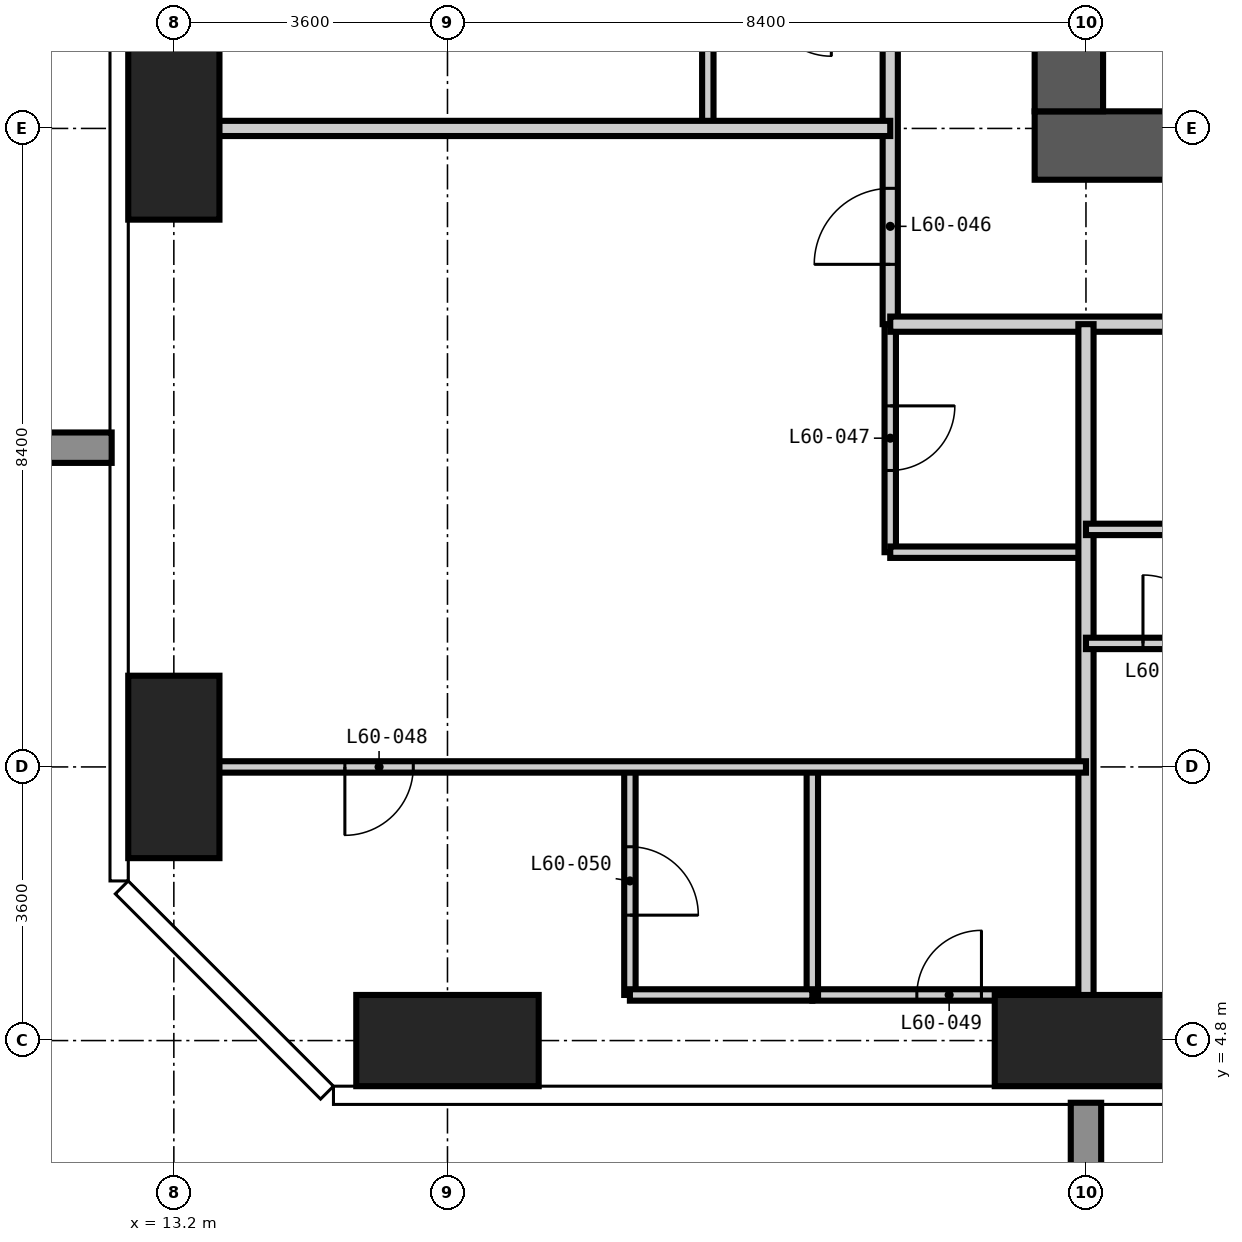
"""IFC4 building model, lengths in metres.
Left out: names, types, materials, properties, quantities, classifications, styles, units other than length and angle.
Written with IfcOpenShell. Run it as: python <this file> out.ifc"""

import sys

from ifc_helpers import new_model, si_unit, direction, frame, frame_2d, origin, origin_2d, place, context, subcontext, project, spatial, rectangle, extrude, element, fill, save


model = new_model("IFC4")
c1 = context("Model", 3, precision=1e-05, world=origin(), true_north=direction((0.0, 1.0)))
c2 = subcontext(c1, "Body", "Model", "MODEL_VIEW")
j1 = project(units=[si_unit("LENGTHUNIT", "METRE"), si_unit("PLANEANGLEUNIT", "RADIAN")], contexts=[c1])
p1 = place(None, origin())
s1 = spatial("IfcSite", under=j1, at=p1, CompositionType="ELEMENT")
p2 = place(p1, origin())
s2 = spatial("IfcBuilding", under=s1, at=p2, CompositionType="ELEMENT")
p3 = place(p2, frame((0.0, 0.0, 233.4)))
s3 = spatial("IfcBuildingStorey", under=s2, at=p3, CompositionType="ELEMENT", Elevation=233.4)
for number, where, z_axis, x_axis in (
    (1, (13.2, 8.4, -0.35), (0.0, 0.0, 1.0), (1.0, 0.0, 0.0)),
    (2, (13.2, 16.8, -0.35), (0.0, 0.0, 1.0), (1.0, 0.0, 0.0)),
):
    element("IfcColumn", number, at=place(p3, frame(where, z_axis=z_axis, x_axis=x_axis)), inside=s3, PredefinedType="COLUMN", context=c2, shape_type="SweptSolid", body=[
        extrude(rectangle(XDim=1.2, YDim=2.4, at=origin_2d()), origin(), (0.0, 0.0, 1.0), 3.9),
    ])
for number, where, z_axis, x_axis in (
    (3, (16.8, 4.8, -0.35), (0.0, 0.0, 1.0), (1.0, 0.0, 0.0)),
    (4, (25.2, 4.8, -0.35), (0.0, 0.0, 1.0), (1.0, 0.0, 0.0)),
):
    element("IfcColumn", number, at=place(p3, frame(where, z_axis=z_axis, x_axis=x_axis)), inside=s3, PredefinedType="COLUMN", context=c2, shape_type="SweptSolid", body=[
        extrude(rectangle(XDim=2.4, YDim=1.2, at=origin_2d()), origin(), (0.0, 0.0, 1.0), 3.9),
    ])
p4 = place(p3, frame((24.525, 16.575, -0.35), z_axis=(0.0, 0.0, 1.0), x_axis=(1.0, 0.0, 0.0)))
e5 = element("IfcWall", 5, at=p4, inside=s3, PredefinedType="SHEAR", context=c2, shape_type="SweptSolid", body=[
    extrude(rectangle(XDim=18.15, YDim=0.9, at=frame_2d((9.075, 0.0))), origin(), (0.0, 0.0, 1.0), 3.9),
])
p5 = place(p4, frame((4.375, 0.0, 0.35)))
e6 = element("IfcOpeningElement", 6, at=p5, cuts=e5, PredefinedType="OPENING", context=c2, shape_type="SweptSolid", body=[
    extrude(rectangle(XDim=1.0, YDim=2.1, at=frame_2d((0.5, 1.05))), frame((0.0, 0.46, 0.0), z_axis=(0.0, -1.0, 0.0), x_axis=(1.0, 0.0, 0.0)), (0.0, 0.0, 1.0), 0.92),
])
p6 = place(p4, frame((10.675, 0.0, 0.35)))
e7 = element("IfcOpeningElement", 7, at=p6, cuts=e5, PredefinedType="OPENING", context=c2, shape_type="SweptSolid", body=[
    extrude(rectangle(XDim=1.0, YDim=2.1, at=frame_2d((0.5, 1.05))), frame((0.0, 0.46, 0.0), z_axis=(0.0, -1.0, 0.0), x_axis=(1.0, 0.0, 0.0)), (0.0, 0.0, 1.0), 0.92),
])
p7 = place(p3, frame((24.975, 41.775, -0.35), z_axis=(0.0, 0.0, 1.0), x_axis=(0.0, -1.0, 0.0)))
e8 = element("IfcWall", 8, at=p7, inside=s3, PredefinedType="SHEAR", context=c2, shape_type="SweptSolid", body=[
    extrude(rectangle(XDim=24.75, YDim=0.9, at=frame_2d((12.375, 0.0))), origin(), (0.0, 0.0, 1.0), 3.9),
])
p8 = place(p7, frame((11.875, 0.0, 0.35)))
e9 = element("IfcOpeningElement", 9, at=p8, cuts=e8, PredefinedType="OPENING", context=c2, shape_type="SweptSolid", body=[
    extrude(rectangle(XDim=1.0, YDim=2.1, at=frame_2d((0.5, 1.05))), frame((0.0, 0.46, 0.0), z_axis=(0.0, -1.0, 0.0), x_axis=(1.0, 0.0, 0.0)), (0.0, 0.0, 1.0), 0.92),
])
p9 = place(p3, frame((20.225, 16.8, 0.0), z_axis=(0.0, 0.0, 1.0), x_axis=(0.0, 1.0, 0.0)))
e10 = element("IfcWall", 10, at=p9, inside=s3, PredefinedType="PARTITIONING", context=c2, shape_type="SweptSolid", body=[
    extrude(rectangle(XDim=1.8, YDim=0.15, at=frame_2d((0.9, 0.0))), origin(), (0.0, 0.0, 1.0), 3.55),
])
p10 = place(p3, frame((22.625, 11.225, 0.0), z_axis=(0.0, 0.0, 1.0), x_axis=(0.0, 1.0, 0.0)))
e11 = element("IfcWall", 11, at=p10, inside=s3, PredefinedType="PARTITIONING", context=c2, shape_type="SweptSolid", body=[
    extrude(rectangle(XDim=3.0, YDim=0.15, at=frame_2d((1.5, 0.0))), origin(), (0.0, 0.0, 1.0), 3.55),
])
p11 = place(p10, frame((1.075, 0.0, 0.0)))
e12 = element("IfcOpeningElement", 12, at=p11, cuts=e11, PredefinedType="OPENING", context=c2, shape_type="SweptSolid", body=[
    extrude(rectangle(XDim=0.85, YDim=2.1, at=frame_2d((0.425, 1.05))), frame((0.0, 0.085, 0.0), z_axis=(0.0, -1.0, 0.0), x_axis=(1.0, 0.0, 0.0)), (0.0, 0.0, 1.0), 0.17),
])
p12 = place(p3, frame((21.6, 5.4, 0.0), z_axis=(0.0, 0.0, 1.0), x_axis=(1.0, 0.0, 0.0)))
e13 = element("IfcWall", 13, at=p12, inside=s3, PredefinedType="PARTITIONING", context=c2, shape_type="SweptSolid", body=[
    extrude(rectangle(XDim=3.6, YDim=0.15, at=frame_2d((1.8, 0.0))), origin(), (0.0, 0.0, 1.0), 3.55),
])
p13 = place(p12, frame((1.375, 0.0, 0.0)))
e14 = element("IfcOpeningElement", 14, at=p13, cuts=e13, PredefinedType="OPENING", context=c2, shape_type="SweptSolid", body=[
    extrude(rectangle(XDim=0.85, YDim=2.1, at=frame_2d((0.425, 1.05))), frame((0.0, 0.085, 0.0), z_axis=(0.0, -1.0, 0.0), x_axis=(1.0, 0.0, 0.0)), (0.0, 0.0, 1.0), 0.17),
])
p14 = place(p3, frame((22.625, 11.225, 0.0), z_axis=(0.0, 0.0, 1.0), x_axis=(1.0, 0.0, 0.0)))
e15 = element("IfcWall", 15, at=p14, inside=s3, PredefinedType="PARTITIONING", context=c2, shape_type="SweptSolid", body=[
    extrude(rectangle(XDim=2.575, YDim=0.15, at=frame_2d((1.288, 0.0))), origin(), (0.0, 0.0, 1.0), 3.55),
])
p15 = place(p3, frame((22.625, 14.225, 0.0), z_axis=(0.0, 0.0, 1.0), x_axis=(0.0, 1.0, 0.0)))
e16 = element("IfcWall", 16, at=p15, inside=s3, PredefinedType="PARTITIONING", context=c2, shape_type="SweptSolid", body=[
    extrude(rectangle(XDim=30.95, YDim=0.2, at=frame_2d((15.475, 0.0))), origin(), (0.0, 0.0, 1.0), 3.55),
])
p16 = place(p15, frame((5.075, 0.0, 0.0)))
e17 = element("IfcOpeningElement", 17, at=p16, cuts=e16, PredefinedType="OPENING", context=c2, shape_type="SweptSolid", body=[
    extrude(rectangle(XDim=1.0, YDim=2.2, at=frame_2d((0.5, 1.1))), frame((0.0, 0.11, 0.0), z_axis=(0.0, -1.0, 0.0), x_axis=(1.0, 0.0, 0.0)), (0.0, 0.0, 1.0), 0.22),
])
p17 = place(p15, frame((13.475, 0.0, 0.0)))
e18 = element("IfcOpeningElement", 18, at=p17, cuts=e16, PredefinedType="OPENING", context=c2, shape_type="SweptSolid", body=[
    extrude(rectangle(XDim=1.0, YDim=2.2, at=frame_2d((0.5, 1.1))), frame((0.0, 0.11, 0.0), z_axis=(0.0, -1.0, 0.0), x_axis=(1.0, 0.0, 0.0)), (0.0, 0.0, 1.0), 0.22),
])
p18 = place(p15, frame((21.875, 0.0, 0.0)))
e19 = element("IfcOpeningElement", 19, at=p18, cuts=e16, PredefinedType="OPENING", context=c2, shape_type="SweptSolid", body=[
    extrude(rectangle(XDim=1.0, YDim=2.2, at=frame_2d((0.5, 1.1))), frame((0.0, 0.11, 0.0), z_axis=(0.0, -1.0, 0.0), x_axis=(1.0, 0.0, 0.0)), (0.0, 0.0, 1.0), 0.22),
])
p19 = place(p15, frame((0.787, 0.0, 0.0)))
e20 = element("IfcOpeningElement", 20, at=p19, cuts=e16, PredefinedType="OPENING", context=c2, shape_type="SweptSolid", body=[
    extrude(rectangle(XDim=1.0, YDim=2.2, at=frame_2d((0.5, 1.1))), frame((0.0, 0.11, 0.0), z_axis=(0.0, -1.0, 0.0), x_axis=(1.0, 0.0, 0.0)), (0.0, 0.0, 1.0), 0.22),
])
p20 = place(p15, frame((28.862, 0.0, 0.0)))
e21 = element("IfcOpeningElement", 21, at=p20, cuts=e16, PredefinedType="OPENING", context=c2, shape_type="SweptSolid", body=[
    extrude(rectangle(XDim=1.0, YDim=2.2, at=frame_2d((0.5, 1.1))), frame((0.0, 0.11, 0.0), z_axis=(0.0, -1.0, 0.0), x_axis=(1.0, 0.0, 0.0)), (0.0, 0.0, 1.0), 0.22),
])
p21 = place(p3, frame((44.875, 14.225, 0.0), z_axis=(0.0, 0.0, 1.0), x_axis=(-1.0, 0.0, 0.0)))
e22 = element("IfcWall", 22, at=p21, inside=s3, PredefinedType="PARTITIONING", context=c2, shape_type="SweptSolid", body=[
    extrude(rectangle(XDim=22.25, YDim=0.2, at=frame_2d((11.125, 0.0))), origin(), (0.0, 0.0, 1.0), 3.55),
])
p22 = place(p21, frame((15.875, 0.0, 0.0)))
e23 = element("IfcOpeningElement", 23, at=p22, cuts=e22, PredefinedType="OPENING", context=c2, shape_type="SweptSolid", body=[
    extrude(rectangle(XDim=1.0, YDim=2.2, at=frame_2d((0.5, 1.1))), frame((0.0, 0.11, 0.0), z_axis=(0.0, -1.0, 0.0), x_axis=(1.0, 0.0, 0.0)), (0.0, 0.0, 1.0), 0.22),
])
p23 = place(p21, frame((9.425, 0.0, 0.0)))
e24 = element("IfcOpeningElement", 24, at=p23, cuts=e22, PredefinedType="OPENING", context=c2, shape_type="SweptSolid", body=[
    extrude(rectangle(XDim=1.0, YDim=2.2, at=frame_2d((0.5, 1.1))), frame((0.0, 0.11, 0.0), z_axis=(0.0, -1.0, 0.0), x_axis=(1.0, 0.0, 0.0)), (0.0, 0.0, 1.0), 0.22),
])
p24 = place(p21, frame((5.675, 0.0, 0.0)))
e25 = element("IfcOpeningElement", 25, at=p24, cuts=e22, PredefinedType="OPENING", context=c2, shape_type="SweptSolid", body=[
    extrude(rectangle(XDim=1.0, YDim=2.2, at=frame_2d((0.5, 1.1))), frame((0.0, 0.11, 0.0), z_axis=(0.0, -1.0, 0.0), x_axis=(1.0, 0.0, 0.0)), (0.0, 0.0, 1.0), 0.22),
])
p25 = place(p3, frame((25.2, 4.182, 0.0), z_axis=(0.0, 0.0, 1.0), x_axis=(0.0, 1.0, 0.0)))
e26 = element("IfcWall", 26, at=p25, inside=s3, PredefinedType="PARTITIONING", context=c2, shape_type="SweptSolid", body=[
    extrude(rectangle(XDim=10.043, YDim=0.2, at=frame_2d((5.021, 0.0))), origin(), (0.0, 0.0, 1.0), 3.55),
])
p26 = place(p3, frame((12.582, 16.8, 0.0), z_axis=(0.0, 0.0, 1.0), x_axis=(1.0, 0.0, 0.0)))
e27 = element("IfcWall", 27, at=p26, inside=s3, PredefinedType="PARTITIONING", context=c2, shape_type="SweptSolid", body=[
    extrude(rectangle(XDim=10.043, YDim=0.2, at=frame_2d((5.021, 0.0))), origin(), (0.0, 0.0, 1.0), 3.55),
])
p27 = place(p3, frame((19.2, 5.4, 0.0), z_axis=(0.0, 0.0, 1.0), x_axis=(0.0, 1.0, 0.0)))
e28 = element("IfcWall", 28, at=p27, inside=s3, PredefinedType="PARTITIONING", context=c2, shape_type="SweptSolid", body=[
    extrude(rectangle(XDim=3.0, YDim=0.15, at=frame_2d((1.5, 0.0))), origin(), (0.0, 0.0, 1.0), 3.55),
])
p28 = place(p27, frame((1.05, 0.0, 0.0)))
e29 = element("IfcOpeningElement", 29, at=p28, cuts=e28, PredefinedType="OPENING", context=c2, shape_type="SweptSolid", body=[
    extrude(rectangle(XDim=0.9, YDim=2.1, at=frame_2d((0.45, 1.05))), frame((0.0, 0.085, 0.0), z_axis=(0.0, -1.0, 0.0), x_axis=(1.0, 0.0, 0.0)), (0.0, 0.0, 1.0), 0.17),
])
p29 = place(p3, frame((21.6, 5.4, 0.0), z_axis=(0.0, 0.0, 1.0), x_axis=(0.0, 1.0, 0.0)))
e30 = element("IfcWall", 30, at=p29, inside=s3, PredefinedType="PARTITIONING", context=c2, shape_type="SweptSolid", body=[
    extrude(rectangle(XDim=3.0, YDim=0.15, at=frame_2d((1.5, 0.0))), origin(), (0.0, 0.0, 1.0), 3.55),
])
p30 = place(p3, frame((19.2, 5.4, 0.0), z_axis=(0.0, 0.0, 1.0), x_axis=(1.0, 0.0, 0.0)))
e31 = element("IfcWall", 31, at=p30, inside=s3, PredefinedType="PARTITIONING", context=c2, shape_type="SweptSolid", body=[
    extrude(rectangle(XDim=2.4, YDim=0.15, at=frame_2d((1.2, 0.0))), origin(), (0.0, 0.0, 1.0), 3.55),
])
p31 = place(p3, frame((12.582, 8.4, 0.0), z_axis=(0.0, 0.0, 1.0), x_axis=(1.0, 0.0, 0.0)))
e32 = element("IfcWall", 32, at=p31, inside=s3, PredefinedType="PARTITIONING", context=c2, shape_type="SweptSolid", body=[
    extrude(rectangle(XDim=12.618, YDim=0.15, at=frame_2d((6.309, 0.0))), origin(), (0.0, 0.0, 1.0), 3.55),
])
p32 = place(p31, frame((2.868, 0.0, 0.0)))
e33 = element("IfcOpeningElement", 33, at=p32, cuts=e32, PredefinedType="OPENING", context=c2, shape_type="SweptSolid", body=[
    extrude(rectangle(XDim=0.9, YDim=2.1, at=frame_2d((0.45, 1.05))), frame((0.0, 0.085, 0.0), z_axis=(0.0, -1.0, 0.0), x_axis=(1.0, 0.0, 0.0)), (0.0, 0.0, 1.0), 0.17),
])
p33 = place(p3, frame((25.2, 10.025, 0.0), z_axis=(0.0, 0.0, 1.0), x_axis=(1.0, 0.0, 0.0)))
e34 = element("IfcWall", 34, at=p33, inside=s3, PredefinedType="PARTITIONING", context=c2, shape_type="SweptSolid", body=[
    extrude(rectangle(XDim=2.4, YDim=0.15, at=frame_2d((1.2, 0.0))), origin(), (0.0, 0.0, 1.0), 3.55),
])
p34 = place(p33, frame((0.75, 0.0, 0.0)))
e35 = element("IfcOpeningElement", 35, at=p34, cuts=e34, PredefinedType="OPENING", context=c2, shape_type="SweptSolid", body=[
    extrude(rectangle(XDim=0.9, YDim=2.1, at=frame_2d((0.45, 1.05))), frame((0.0, 0.085, 0.0), z_axis=(0.0, -1.0, 0.0), x_axis=(1.0, 0.0, 0.0)), (0.0, 0.0, 1.0), 0.17),
])
p35 = place(p3, frame((25.2, 11.525, 0.0), z_axis=(0.0, 0.0, 1.0), x_axis=(1.0, 0.0, 0.0)))
e36 = element("IfcWall", 36, at=p35, inside=s3, PredefinedType="PARTITIONING", context=c2, shape_type="SweptSolid", body=[
    extrude(rectangle(XDim=2.4, YDim=0.15, at=frame_2d((1.2, 0.0))), origin(), (0.0, 0.0, 1.0), 3.55),
])
p36 = place(p34, origin())
e37 = element("IfcDoor", 37, at=p36, inside=s3, OperationType="SINGLE_SWING_LEFT", PredefinedType="DOOR", context=c2, shape_type="SweptSolid", body=[
    extrude(rectangle(XDim=0.9, YDim=2.1, at=frame_2d((0.45, 1.05))), frame((0.0, 0.025, 0.0), z_axis=(0.0, -1.0, 0.0), x_axis=(1.0, 0.0, 0.0)), (0.0, 0.0, 1.0), 0.05),
])
fill(e35, e37)
p37 = place(p19, origin())
e38 = element("IfcDoor", 38, at=p37, inside=s3, OperationType="SINGLE_SWING_LEFT", PredefinedType="DOOR", context=c2, shape_type="SweptSolid", body=[
    extrude(rectangle(XDim=1.0, YDim=2.2, at=frame_2d((0.5, 1.1))), frame((0.0, 0.025, 0.0), z_axis=(0.0, -1.0, 0.0), x_axis=(1.0, 0.0, 0.0)), (0.0, 0.0, 1.0), 0.05),
])
fill(e20, e38)
p38 = place(p11, frame((0.85, 0.0, 0.0), z_axis=(0.0, 0.0, 1.0), x_axis=(-1.0, 0.0, 0.0)))
e39 = element("IfcDoor", 39, at=p38, inside=s3, OperationType="SINGLE_SWING_LEFT", PredefinedType="DOOR", context=c2, shape_type="SweptSolid", body=[
    extrude(rectangle(XDim=0.85, YDim=2.1, at=frame_2d((0.425, 1.05))), frame((0.0, 0.025, 0.0), z_axis=(0.0, -1.0, 0.0), x_axis=(1.0, 0.0, 0.0)), (0.0, 0.0, 1.0), 0.05),
])
fill(e12, e39)
p39 = place(p32, frame((0.9, 0.0, 0.0), z_axis=(0.0, 0.0, 1.0), x_axis=(-1.0, 0.0, 0.0)))
e40 = element("IfcDoor", 40, at=p39, inside=s3, OperationType="SINGLE_SWING_RIGHT", PredefinedType="DOOR", context=c2, shape_type="SweptSolid", body=[
    extrude(rectangle(XDim=0.9, YDim=2.1, at=frame_2d((0.45, 1.05))), frame((0.0, 0.025, 0.0), z_axis=(0.0, -1.0, 0.0), x_axis=(1.0, 0.0, 0.0)), (0.0, 0.0, 1.0), 0.05),
])
fill(e33, e40)
p40 = place(p13, origin())
e41 = element("IfcDoor", 41, at=p40, inside=s3, OperationType="SINGLE_SWING_RIGHT", PredefinedType="DOOR", context=c2, shape_type="SweptSolid", body=[
    extrude(rectangle(XDim=0.85, YDim=2.1, at=frame_2d((0.425, 1.05))), frame((0.0, 0.025, 0.0), z_axis=(0.0, -1.0, 0.0), x_axis=(1.0, 0.0, 0.0)), (0.0, 0.0, 1.0), 0.05),
])
fill(e14, e41)
p41 = place(p28, frame((0.9, 0.0, 0.0), z_axis=(0.0, 0.0, 1.0), x_axis=(-1.0, 0.0, 0.0)))
e42 = element("IfcDoor", 42, at=p41, inside=s3, OperationType="SINGLE_SWING_RIGHT", PredefinedType="DOOR", context=c2, shape_type="SweptSolid", body=[
    extrude(rectangle(XDim=0.9, YDim=2.1, at=frame_2d((0.45, 1.05))), frame((0.0, 0.025, 0.0), z_axis=(0.0, -1.0, 0.0), x_axis=(1.0, 0.0, 0.0)), (0.0, 0.0, 1.0), 0.05),
])
fill(e29, e42)
save(model, sys.argv[1])
